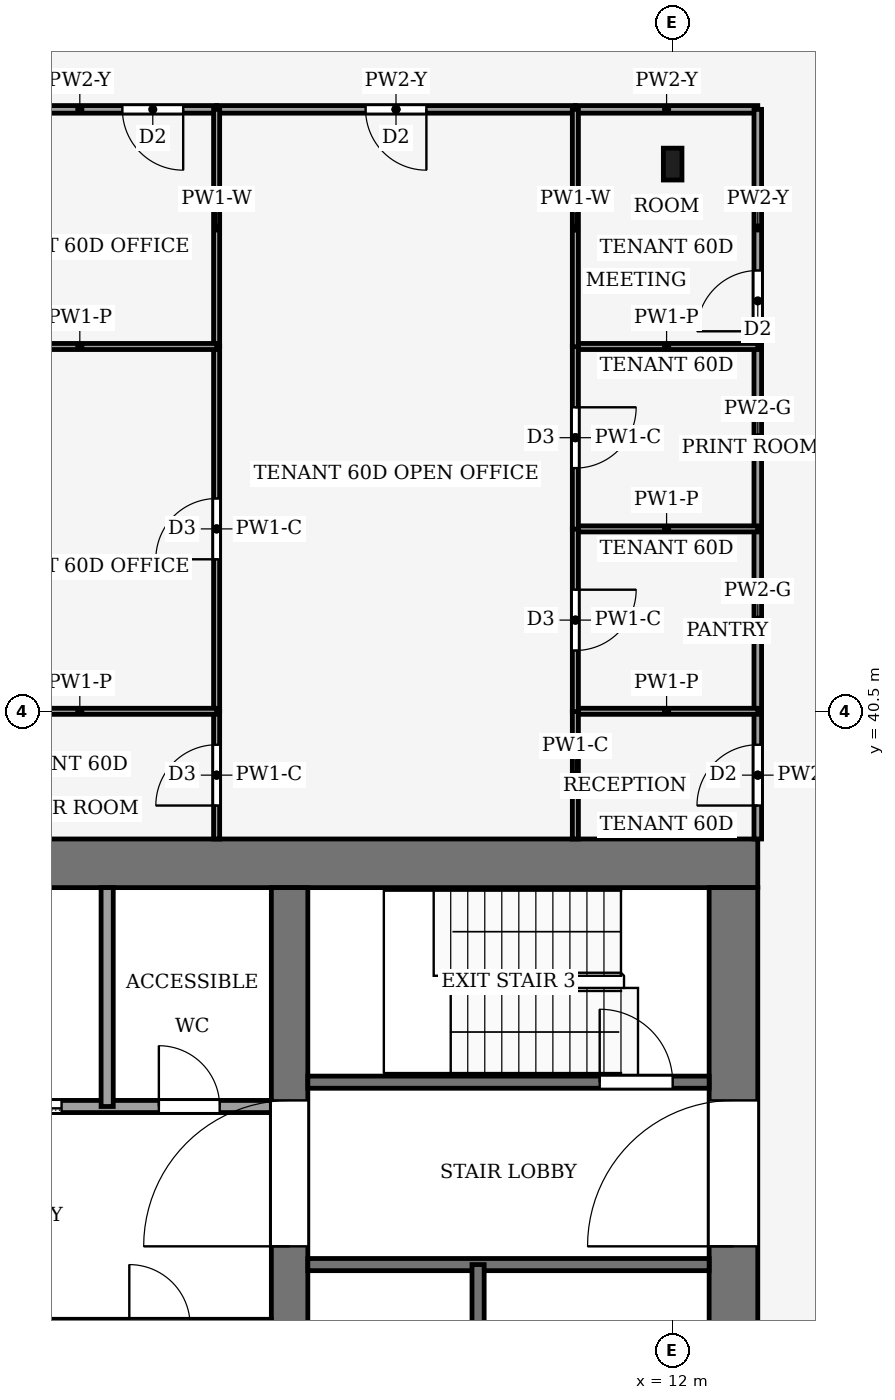
"""IFC4 building model, lengths in metres.
Left out: names, types, materials, properties, quantities, classifications, styles, units other than length and angle.
Written with IfcOpenShell. Run it as: python <this file> out.ifc"""

import sys

from ifc_helpers import new_model, si_unit, direction, frame, frame_2d, origin, origin_2d, place, context, subcontext, project, spatial, rectangle, i_section, extrude, element, fill, save


model = new_model("IFC4")
c1 = context("Model", 3, precision=1e-05, world=origin(), true_north=direction((0.0, 1.0)))
c2 = subcontext(c1, "Body", "Model", "MODEL_VIEW")
j1 = project(units=[si_unit("LENGTHUNIT", "METRE"), si_unit("PLANEANGLEUNIT", "RADIAN")], contexts=[c1])
p1 = place(None, origin())
s1 = spatial("IfcSite", under=j1, at=p1, CompositionType="ELEMENT")
p2 = place(p1, origin())
s2 = spatial("IfcBuilding", under=s1, at=p2, CompositionType="ELEMENT")
p3 = place(p2, frame((0.0, 0.0, 262.0)))
s3 = spatial("IfcBuildingStorey", under=s2, at=p3, CompositionType="ELEMENT", Elevation=262.0)
p4 = place(p3, frame((-13.4, 38.0, -0.13), z_axis=(0.0, 0.0, 1.0), x_axis=(1.0, 0.0, 0.0)))
e1 = element("IfcWall", 1, at=p4, inside=s3, PredefinedType="SHEAR", context=c2, shape_type="SweptSolid", body=[
    extrude(rectangle(XDim=26.8, YDim=0.8, at=frame_2d((13.4, 0.0))), origin(), (0.0, 0.0, 1.0), 4.0),
])
p5 = place(p3, frame((13.0, 18.4, -0.13), z_axis=(0.0, 0.0, 1.0), x_axis=(0.0, 1.0, 0.0)))
e2 = element("IfcWall", 2, at=p5, inside=s3, PredefinedType="SHEAR", context=c2, shape_type="SweptSolid", body=[
    extrude(rectangle(XDim=19.2, YDim=0.8, at=frame_2d((9.6, 0.0))), origin(), (0.0, 0.0, 1.0), 4.0),
])
p6 = place(p5, frame((2.8, 0.0, 0.13)))
e3 = element("IfcOpeningElement", 3, at=p6, cuts=e2, PredefinedType="OPENING", context=c2, shape_type="SweptSolid", body=[
    extrude(rectangle(XDim=2.4, YDim=2.4, at=frame_2d((1.2, 1.2))), frame((0.0, 0.41, 0.0), z_axis=(0.0, -1.0, 0.0), x_axis=(1.0, 0.0, 0.0)), (0.0, 0.0, 1.0), 0.82),
])
p7 = place(p5, frame((13.3, 0.0, 0.13)))
e4 = element("IfcOpeningElement", 4, at=p7, cuts=e2, PredefinedType="OPENING", context=c2, shape_type="SweptSolid", body=[
    extrude(rectangle(XDim=2.4, YDim=2.4, at=frame_2d((1.2, 1.2))), frame((0.0, 0.41, 0.0), z_axis=(0.0, -1.0, 0.0), x_axis=(1.0, 0.0, 0.0)), (0.0, 0.0, 1.0), 0.82),
])
p8 = place(p3, frame((5.7, 18.4, -0.13), z_axis=(0.0, 0.0, 1.0), x_axis=(0.0, 1.0, 0.0)))
e5 = element("IfcWall", 5, at=p8, inside=s3, PredefinedType="SHEAR", context=c2, shape_type="SweptSolid", body=[
    extrude(rectangle(XDim=19.2, YDim=0.6, at=frame_2d((9.6, 0.0))), origin(), (0.0, 0.0, 1.0), 4.0),
])
p9 = place(p8, frame((8.35, 0.0, 0.13)))
e6 = element("IfcOpeningElement", 6, at=p9, cuts=e5, PredefinedType="OPENING", context=c2, shape_type="SweptSolid", body=[
    extrude(rectangle(XDim=0.9, YDim=2.1, at=frame_2d((0.45, 1.05))), frame((0.0, 0.31, 0.0), z_axis=(0.0, -1.0, 0.0), x_axis=(1.0, 0.0, 0.0)), (0.0, 0.0, 1.0), 0.62),
])
p10 = place(p8, frame((13.3, 0.0, 0.13)))
e7 = element("IfcOpeningElement", 7, at=p10, cuts=e5, PredefinedType="OPENING", context=c2, shape_type="SweptSolid", body=[
    extrude(rectangle(XDim=2.4, YDim=2.4, at=frame_2d((1.2, 1.2))), frame((0.0, 0.31, 0.0), z_axis=(0.0, -1.0, 0.0), x_axis=(1.0, 0.0, 0.0)), (0.0, 0.0, 1.0), 0.62),
])
p11 = place(p3, frame((12.0, 49.5, 0.0), z_axis=(0.0, 0.0, 1.0), x_axis=(1.0, 0.0, 0.0)))
e8 = element("IfcColumn", 8, at=p11, inside=s3, PredefinedType="COLUMN", context=c2, shape_type="SweptSolid", body=[
    extrude(i_section(OverallWidth=0.306, OverallDepth=0.524, WebThickness=0.012, FlangeThickness=0.04, FilletRadius=0.027, at=origin_2d()), origin(), (0.0, 0.0, 1.0), 4.0),
])
p12 = place(p3, frame((6.0, 31.4, 0.0), z_axis=(0.0, 0.0, 1.0), x_axis=(1.0, 0.0, 0.0)))
e9 = element("IfcWall", 9, at=p12, inside=s3, PredefinedType="PARTITIONING", context=c2, shape_type="SweptSolid", body=[
    extrude(rectangle(XDim=6.6, YDim=0.2, at=frame_2d((3.3, 0.0))), origin(), (0.0, 0.0, 1.0), 3.87),
])
p13 = place(p3, frame((-5.4, 34.0, 0.0), z_axis=(0.0, 0.0, 1.0), x_axis=(1.0, 0.0, 0.0)))
e10 = element("IfcWall", 10, at=p13, inside=s3, PredefinedType="PARTITIONING", context=c2, shape_type="SweptSolid", body=[
    extrude(rectangle(XDim=10.8, YDim=0.2, at=frame_2d((5.4, 0.0))), origin(), (0.0, 0.0, 1.0), 3.87),
])
p14 = place(p13, frame((6.15, 0.0, 0.0)))
e11 = element("IfcOpeningElement", 11, at=p14, cuts=e10, PredefinedType="OPENING", context=c2, shape_type="SweptSolid", body=[
    extrude(rectangle(XDim=1.2, YDim=2.2, at=frame_2d((0.6, 1.1))), frame((0.0, 0.11, 0.0), z_axis=(0.0, -1.0, 0.0), x_axis=(1.0, 0.0, 0.0)), (0.0, 0.0, 1.0), 0.22),
])
p15 = place(p13, frame((8.95, 0.0, 0.0)))
e12 = element("IfcOpeningElement", 12, at=p15, cuts=e10, PredefinedType="OPENING", context=c2, shape_type="SweptSolid", body=[
    extrude(rectangle(XDim=1.0, YDim=2.1, at=frame_2d((0.5, 1.05))), frame((0.0, 0.11, 0.0), z_axis=(0.0, -1.0, 0.0), x_axis=(1.0, 0.0, 0.0)), (0.0, 0.0, 1.0), 0.22),
])
p16 = place(p3, frame((6.0, 34.4, 0.0), z_axis=(0.0, 0.0, 1.0), x_axis=(1.0, 0.0, 0.0)))
e13 = element("IfcWall", 13, at=p16, inside=s3, PredefinedType="PARTITIONING", context=c2, shape_type="SweptSolid", body=[
    extrude(rectangle(XDim=6.6, YDim=0.2, at=frame_2d((3.3, 0.0))), origin(), (0.0, 0.0, 1.0), 3.87),
])
p17 = place(p16, frame((4.8, 0.0, 0.0)))
e14 = element("IfcOpeningElement", 14, at=p17, cuts=e13, PredefinedType="OPENING", context=c2, shape_type="SweptSolid", body=[
    extrude(rectangle(XDim=1.2, YDim=2.2, at=frame_2d((0.6, 1.1))), frame((0.0, 0.11, 0.0), z_axis=(0.0, -1.0, 0.0), x_axis=(1.0, 0.0, 0.0)), (0.0, 0.0, 1.0), 0.22),
])
p18 = place(p3, frame((2.7, 34.0, 0.0), z_axis=(0.0, 0.0, 1.0), x_axis=(0.0, 1.0, 0.0)))
e15 = element("IfcWall", 15, at=p18, inside=s3, PredefinedType="PARTITIONING", context=c2, shape_type="SweptSolid", body=[
    extrude(rectangle(XDim=3.6, YDim=0.2, at=frame_2d((1.8, 0.0))), origin(), (0.0, 0.0, 1.0), 3.87),
])
p19 = place(p3, frame((8.8, 24.0, 0.0), z_axis=(0.0, 0.0, 1.0), x_axis=(0.0, 1.0, 0.0)))
e16 = element("IfcWall", 16, at=p19, inside=s3, PredefinedType="PARTITIONING", context=c2, shape_type="SweptSolid", body=[
    extrude(rectangle(XDim=7.4, YDim=0.2, at=frame_2d((3.7, 0.0))), origin(), (0.0, 0.0, 1.0), 3.87),
])
p20 = place(p3, frame((13.4, 38.4, 0.0), z_axis=(0.0, 0.0, 1.0), x_axis=(0.0, 1.0, 0.0)))
e17 = element("IfcWall", 17, at=p20, inside=s3, PredefinedType="PARTITIONING", context=c2, shape_type="SweptSolid", body=[
    extrude(rectangle(XDim=2.1, YDim=0.125, at=frame_2d((1.05, 0.0))), origin(), (0.0, 0.0, 1.0), 3.14),
])
p21 = place(p20, frame((0.55, 0.0, 0.0)))
e18 = element("IfcOpeningElement", 18, at=p21, cuts=e17, PredefinedType="OPENING", context=c2, shape_type="SweptSolid", body=[
    extrude(rectangle(XDim=1.0, YDim=2.1, at=frame_2d((0.5, 1.05))), frame((0.0, 0.073, 0.0), z_axis=(0.0, -1.0, 0.0), x_axis=(1.0, 0.0, 0.0)), (0.0, 0.0, 1.0), 0.145),
])
for number, where, z_axis, x_axis in (
    (19, (13.4, 40.5, 0.0), (0.0, 0.0, 1.0), (0.0, 1.0, 0.0)),
    (20, (13.4, 43.5, 0.0), (0.0, 0.0, 1.0), (0.0, 1.0, 0.0)),
):
    element("IfcWall", number, at=place(p3, frame(where, z_axis=z_axis, x_axis=x_axis)), inside=s3, PredefinedType="PARTITIONING", context=c2, shape_type="SweptSolid", body=[
        extrude(rectangle(XDim=3.0, YDim=0.125, at=frame_2d((1.5, 0.0))), origin(), (0.0, 0.0, 1.0), 3.87),
    ])
p22 = place(p3, frame((13.4, 50.4, 0.0), z_axis=(0.0, 0.0, 1.0), x_axis=(-1.0, 0.0, 0.0)))
e21 = element("IfcWall", 21, at=p22, inside=s3, PredefinedType="PARTITIONING", context=c2, shape_type="SweptSolid", body=[
    extrude(rectangle(XDim=3.0, YDim=0.125, at=frame_2d((1.5, 0.0))), origin(), (0.0, 0.0, 1.0), 3.24),
])
p23 = place(p3, frame((13.4, 46.5, 0.0), z_axis=(0.0, 0.0, 1.0), x_axis=(0.0, 1.0, 0.0)))
e22 = element("IfcWall", 22, at=p23, inside=s3, PredefinedType="PARTITIONING", context=c2, shape_type="SweptSolid", body=[
    extrude(rectangle(XDim=3.9, YDim=0.125, at=frame_2d((1.95, 0.0))), origin(), (0.0, 0.0, 1.0), 3.24),
])
p24 = place(p23, frame((0.25, 0.0, 0.0)))
e23 = element("IfcOpeningElement", 23, at=p24, cuts=e22, PredefinedType="OPENING", context=c2, shape_type="SweptSolid", body=[
    extrude(rectangle(XDim=1.0, YDim=2.1, at=frame_2d((0.5, 1.05))), frame((0.0, 0.073, 0.0), z_axis=(0.0, -1.0, 0.0), x_axis=(1.0, 0.0, 0.0)), (0.0, 0.0, 1.0), 0.145),
])
p25 = place(p3, frame((10.4, 50.4, 0.0), z_axis=(0.0, 0.0, 1.0), x_axis=(-1.0, 0.0, 0.0)))
e24 = element("IfcWall", 24, at=p25, inside=s3, PredefinedType="PARTITIONING", context=c2, shape_type="SweptSolid", body=[
    extrude(rectangle(XDim=5.9, YDim=0.125, at=frame_2d((2.95, 0.0))), origin(), (0.0, 0.0, 1.0), 3.24),
])
p26 = place(p25, frame((2.45, 0.0, 0.0)))
e25 = element("IfcOpeningElement", 25, at=p26, cuts=e24, PredefinedType="OPENING", context=c2, shape_type="SweptSolid", body=[
    extrude(rectangle(XDim=1.0, YDim=2.1, at=frame_2d((0.5, 1.05))), frame((0.0, 0.073, 0.0), z_axis=(0.0, -1.0, 0.0), x_axis=(1.0, 0.0, 0.0)), (0.0, 0.0, 1.0), 0.145),
])
p27 = place(p3, frame((4.5, 50.4, 0.0), z_axis=(0.0, 0.0, 1.0), x_axis=(-1.0, 0.0, 0.0)))
e26 = element("IfcWall", 26, at=p27, inside=s3, PredefinedType="PARTITIONING", context=c2, shape_type="SweptSolid", body=[
    extrude(rectangle(XDim=4.5, YDim=0.125, at=frame_2d((2.25, 0.0))), origin(), (0.0, 0.0, 1.0), 3.24),
])
p28 = place(p27, frame((0.55, 0.0, 0.0)))
e27 = element("IfcOpeningElement", 27, at=p28, cuts=e26, PredefinedType="OPENING", context=c2, shape_type="SweptSolid", body=[
    extrude(rectangle(XDim=1.0, YDim=2.1, at=frame_2d((0.5, 1.05))), frame((0.0, 0.073, 0.0), z_axis=(0.0, -1.0, 0.0), x_axis=(1.0, 0.0, 0.0)), (0.0, 0.0, 1.0), 0.145),
])
p29 = place(p3, frame((13.4, 40.5, 0.0), z_axis=(0.0, 0.0, 1.0), x_axis=(-1.0, 0.0, 0.0)))
e28 = element("IfcWall", 28, at=p29, inside=s3, PredefinedType="PARTITIONING", context=c2, shape_type="SweptSolid", body=[
    extrude(rectangle(XDim=3.0, YDim=0.1, at=frame_2d((1.5, 0.0))), origin(), (0.0, 0.0, 1.0), 3.44),
])
p30 = place(p3, frame((10.4, 40.504, 0.0), z_axis=(0.0, 0.0, 1.0), x_axis=(0.0, -1.0, 0.0)))
e29 = element("IfcWall", 29, at=p30, inside=s3, PredefinedType="PARTITIONING", context=c2, shape_type="SweptSolid", body=[
    extrude(rectangle(XDim=2.104, YDim=0.1, at=frame_2d((1.052, 0.0))), origin(), (0.0, 0.0, 1.0), 3.87),
])
p31 = place(p3, frame((13.4, 43.5, 0.0), z_axis=(0.0, 0.0, 1.0), x_axis=(-1.0, 0.0, 0.0)))
e30 = element("IfcWall", 30, at=p31, inside=s3, PredefinedType="PARTITIONING", context=c2, shape_type="SweptSolid", body=[
    extrude(rectangle(XDim=3.0, YDim=0.1, at=frame_2d((1.5, 0.0))), origin(), (0.0, 0.0, 1.0), 3.44),
])
p32 = place(p3, frame((10.4, 43.504, 0.0), z_axis=(0.0, 0.0, 1.0), x_axis=(0.0, -1.0, 0.0)))
e31 = element("IfcWall", 31, at=p32, inside=s3, PredefinedType="PARTITIONING", context=c2, shape_type="SweptSolid", body=[
    extrude(rectangle(XDim=3.008, YDim=0.1, at=frame_2d((1.504, 0.0))), origin(), (0.0, 0.0, 1.0), 3.87),
])
p33 = place(p32, frame((1.004, 0.0, 0.0)))
e32 = element("IfcOpeningElement", 32, at=p33, cuts=e31, PredefinedType="OPENING", context=c2, shape_type="SweptSolid", body=[
    extrude(rectangle(XDim=1.0, YDim=2.1, at=frame_2d((0.5, 1.05))), frame((0.0, 0.06, 0.0), z_axis=(0.0, -1.0, 0.0), x_axis=(1.0, 0.0, 0.0)), (0.0, 0.0, 1.0), 0.12),
])
p34 = place(p3, frame((13.4, 46.5, 0.0), z_axis=(0.0, 0.0, 1.0), x_axis=(-1.0, 0.0, 0.0)))
e33 = element("IfcWall", 33, at=p34, inside=s3, PredefinedType="PARTITIONING", context=c2, shape_type="SweptSolid", body=[
    extrude(rectangle(XDim=3.0, YDim=0.1, at=frame_2d((1.5, 0.0))), origin(), (0.0, 0.0, 1.0), 3.44),
])
p35 = place(p3, frame((10.4, 46.504, 0.0), z_axis=(0.0, 0.0, 1.0), x_axis=(0.0, -1.0, 0.0)))
e34 = element("IfcWall", 34, at=p35, inside=s3, PredefinedType="PARTITIONING", context=c2, shape_type="SweptSolid", body=[
    extrude(rectangle(XDim=3.008, YDim=0.1, at=frame_2d((1.504, 0.0))), origin(), (0.0, 0.0, 1.0), 3.87),
])
p36 = place(p35, frame((1.004, 0.0, 0.0)))
e35 = element("IfcOpeningElement", 35, at=p36, cuts=e34, PredefinedType="OPENING", context=c2, shape_type="SweptSolid", body=[
    extrude(rectangle(XDim=1.0, YDim=2.1, at=frame_2d((0.5, 1.05))), frame((0.0, 0.06, 0.0), z_axis=(0.0, -1.0, 0.0), x_axis=(1.0, 0.0, 0.0)), (0.0, 0.0, 1.0), 0.12),
])
p37 = place(p3, frame((10.4, 50.4, 0.0), z_axis=(0.0, 0.0, 1.0), x_axis=(0.0, -1.0, 0.0)))
e36 = element("IfcWall", 36, at=p37, inside=s3, PredefinedType="PARTITIONING", context=c2, shape_type="SweptSolid", body=[
    extrude(rectangle(XDim=3.904, YDim=0.1, at=frame_2d((1.952, 0.0))), origin(), (0.0, 0.0, 1.0), 3.24),
])
p38 = place(p3, frame((4.5, 38.4, 0.0), z_axis=(0.0, 0.0, 1.0), x_axis=(0.0, 1.0, 0.0)))
e37 = element("IfcWall", 37, at=p38, inside=s3, PredefinedType="PARTITIONING", context=c2, shape_type="SweptSolid", body=[
    extrude(rectangle(XDim=2.1, YDim=0.1, at=frame_2d((1.05, 0.0))), origin(), (0.0, 0.0, 1.0), 3.87),
])
p39 = place(p38, frame((0.55, 0.0, 0.0)))
e38 = element("IfcOpeningElement", 38, at=p39, cuts=e37, PredefinedType="OPENING", context=c2, shape_type="SweptSolid", body=[
    extrude(rectangle(XDim=1.0, YDim=2.1, at=frame_2d((0.5, 1.05))), frame((0.0, 0.06, 0.0), z_axis=(0.0, -1.0, 0.0), x_axis=(1.0, 0.0, 0.0)), (0.0, 0.0, 1.0), 0.12),
])
p40 = place(p3, frame((4.5, 40.5, 0.0), z_axis=(0.0, 0.0, 1.0), x_axis=(0.0, 1.0, 0.0)))
e39 = element("IfcWall", 39, at=p40, inside=s3, PredefinedType="PARTITIONING", context=c2, shape_type="SweptSolid", body=[
    extrude(rectangle(XDim=6.0, YDim=0.1, at=frame_2d((3.0, 0.0))), origin(), (0.0, 0.0, 1.0), 3.87),
])
p41 = place(p40, frame((2.5, 0.0, 0.0)))
e40 = element("IfcOpeningElement", 40, at=p41, cuts=e39, PredefinedType="OPENING", context=c2, shape_type="SweptSolid", body=[
    extrude(rectangle(XDim=1.0, YDim=2.1, at=frame_2d((0.5, 1.05))), frame((0.0, 0.06, 0.0), z_axis=(0.0, -1.0, 0.0), x_axis=(1.0, 0.0, 0.0)), (0.0, 0.0, 1.0), 0.12),
])
p42 = place(p3, frame((4.5, 50.4, 0.0), z_axis=(0.0, 0.0, 1.0), x_axis=(0.0, -1.0, 0.0)))
e41 = element("IfcWall", 41, at=p42, inside=s3, PredefinedType="PARTITIONING", context=c2, shape_type="SweptSolid", body=[
    extrude(rectangle(XDim=3.9, YDim=0.1, at=frame_2d((1.95, 0.0))), origin(), (0.0, 0.0, 1.0), 3.24),
])
for number, where, z_axis, x_axis in (
    (42, (4.5, 40.5, 0.0), (0.0, 0.0, 1.0), (-1.0, 0.0, 0.0)),
    (43, (4.5, 46.5, 0.0), (0.0, 0.0, 1.0), (-1.0, 0.0, 0.0)),
):
    element("IfcWall", number, at=place(p3, frame(where, z_axis=z_axis, x_axis=x_axis)), inside=s3, PredefinedType="PARTITIONING", context=c2, shape_type="SweptSolid", body=[
        extrude(rectangle(XDim=4.5, YDim=0.1, at=frame_2d((2.25, 0.0))), origin(), (0.0, 0.0, 1.0), 3.44),
    ])
p43 = place(p14, origin())
e44 = element("IfcDoor", 44, at=p43, inside=s3, OperationType="SLIDING_TO_LEFT", PredefinedType="DOOR", context=c2, shape_type="SweptSolid", body=[
    extrude(rectangle(XDim=1.2, YDim=2.2, at=frame_2d((0.6, 1.1))), frame((0.0, 0.025, 0.0), z_axis=(0.0, -1.0, 0.0), x_axis=(1.0, 0.0, 0.0)), (0.0, 0.0, 1.0), 0.05),
])
fill(e11, e44)
p44 = place(p15, origin())
e45 = element("IfcDoor", 45, at=p44, inside=s3, OperationType="SINGLE_SWING_LEFT", PredefinedType="DOOR", context=c2, shape_type="SweptSolid", body=[
    extrude(rectangle(XDim=1.0, YDim=2.1, at=frame_2d((0.5, 1.05))), frame((0.0, 0.025, 0.0), z_axis=(0.0, -1.0, 0.0), x_axis=(1.0, 0.0, 0.0)), (0.0, 0.0, 1.0), 0.05),
])
fill(e12, e45)
p45 = place(p17, origin())
e46 = element("IfcDoor", 46, at=p45, inside=s3, OperationType="SINGLE_SWING_RIGHT", PredefinedType="DOOR", context=c2, shape_type="SweptSolid", body=[
    extrude(rectangle(XDim=1.2, YDim=2.2, at=frame_2d((0.6, 1.1))), frame((0.0, 0.025, 0.0), z_axis=(0.0, -1.0, 0.0), x_axis=(1.0, 0.0, 0.0)), (0.0, 0.0, 1.0), 0.05),
])
fill(e14, e46)
p46 = place(p10, origin())
e47 = element("IfcDoor", 47, at=p46, inside=s3, OperationType="DOUBLE_DOOR_SINGLE_SWING", PredefinedType="DOOR", context=c2, shape_type="SweptSolid", body=[
    extrude(rectangle(XDim=2.4, YDim=2.4, at=frame_2d((1.2, 1.2))), frame((0.0, 0.025, 0.0), z_axis=(0.0, -1.0, 0.0), x_axis=(1.0, 0.0, 0.0)), (0.0, 0.0, 1.0), 0.05),
])
fill(e7, e47)
p47 = place(p7, origin())
e48 = element("IfcDoor", 48, at=p47, inside=s3, OperationType="DOUBLE_DOOR_SINGLE_SWING", PredefinedType="DOOR", context=c2, shape_type="SweptSolid", body=[
    extrude(rectangle(XDim=2.4, YDim=2.4, at=frame_2d((1.2, 1.2))), frame((0.0, 0.025, 0.0), z_axis=(0.0, -1.0, 0.0), x_axis=(1.0, 0.0, 0.0)), (0.0, 0.0, 1.0), 0.05),
])
fill(e4, e48)
p48 = place(p21, origin())
e49 = element("IfcDoor", 49, at=p48, inside=s3, OperationType="SINGLE_SWING_LEFT", PredefinedType="DOOR", context=c2, shape_type="SweptSolid", body=[
    extrude(rectangle(XDim=1.0, YDim=2.1, at=frame_2d((0.5, 1.05))), frame((0.0, 0.025, 0.0), z_axis=(0.0, -1.0, 0.0), x_axis=(1.0, 0.0, 0.0)), (0.0, 0.0, 1.0), 0.05),
])
fill(e18, e49)
p49 = place(p24, origin())
e50 = element("IfcDoor", 50, at=p49, inside=s3, OperationType="SINGLE_SWING_LEFT", PredefinedType="DOOR", context=c2, shape_type="SweptSolid", body=[
    extrude(rectangle(XDim=1.0, YDim=2.1, at=frame_2d((0.5, 1.05))), frame((0.0, 0.025, 0.0), z_axis=(0.0, -1.0, 0.0), x_axis=(1.0, 0.0, 0.0)), (0.0, 0.0, 1.0), 0.05),
])
fill(e23, e50)
p50 = place(p26, origin())
e51 = element("IfcDoor", 51, at=p50, inside=s3, OperationType="SINGLE_SWING_LEFT", PredefinedType="DOOR", context=c2, shape_type="SweptSolid", body=[
    extrude(rectangle(XDim=1.0, YDim=2.1, at=frame_2d((0.5, 1.05))), frame((0.0, 0.025, 0.0), z_axis=(0.0, -1.0, 0.0), x_axis=(1.0, 0.0, 0.0)), (0.0, 0.0, 1.0), 0.05),
])
fill(e25, e51)
p51 = place(p28, origin())
e52 = element("IfcDoor", 52, at=p51, inside=s3, OperationType="SINGLE_SWING_LEFT", PredefinedType="DOOR", context=c2, shape_type="SweptSolid", body=[
    extrude(rectangle(XDim=1.0, YDim=2.1, at=frame_2d((0.5, 1.05))), frame((0.0, 0.025, 0.0), z_axis=(0.0, -1.0, 0.0), x_axis=(1.0, 0.0, 0.0)), (0.0, 0.0, 1.0), 0.05),
])
fill(e27, e52)
p52 = place(p33, origin())
e53 = element("IfcDoor", 53, at=p52, inside=s3, OperationType="SINGLE_SWING_RIGHT", PredefinedType="DOOR", context=c2, shape_type="SweptSolid", body=[
    extrude(rectangle(XDim=1.0, YDim=2.1, at=frame_2d((0.5, 1.05))), frame((0.0, 0.025, 0.0), z_axis=(0.0, -1.0, 0.0), x_axis=(1.0, 0.0, 0.0)), (0.0, 0.0, 1.0), 0.05),
])
fill(e32, e53)
p53 = place(p36, origin())
e54 = element("IfcDoor", 54, at=p53, inside=s3, OperationType="SINGLE_SWING_LEFT", PredefinedType="DOOR", context=c2, shape_type="SweptSolid", body=[
    extrude(rectangle(XDim=1.0, YDim=2.1, at=frame_2d((0.5, 1.05))), frame((0.0, 0.025, 0.0), z_axis=(0.0, -1.0, 0.0), x_axis=(1.0, 0.0, 0.0)), (0.0, 0.0, 1.0), 0.05),
])
fill(e35, e54)
p54 = place(p39, origin())
e55 = element("IfcDoor", 55, at=p54, inside=s3, OperationType="SINGLE_SWING_RIGHT", PredefinedType="DOOR", context=c2, shape_type="SweptSolid", body=[
    extrude(rectangle(XDim=1.0, YDim=2.1, at=frame_2d((0.5, 1.05))), frame((0.0, 0.025, 0.0), z_axis=(0.0, -1.0, 0.0), x_axis=(1.0, 0.0, 0.0)), (0.0, 0.0, 1.0), 0.05),
])
fill(e38, e55)
p55 = place(p41, origin())
e56 = element("IfcDoor", 56, at=p55, inside=s3, OperationType="SINGLE_SWING_LEFT", PredefinedType="DOOR", context=c2, shape_type="SweptSolid", body=[
    extrude(rectangle(XDim=1.0, YDim=2.1, at=frame_2d((0.5, 1.05))), frame((0.0, 0.025, 0.0), z_axis=(0.0, -1.0, 0.0), x_axis=(1.0, 0.0, 0.0)), (0.0, 0.0, 1.0), 0.05),
])
fill(e40, e56)
save(model, sys.argv[1])
